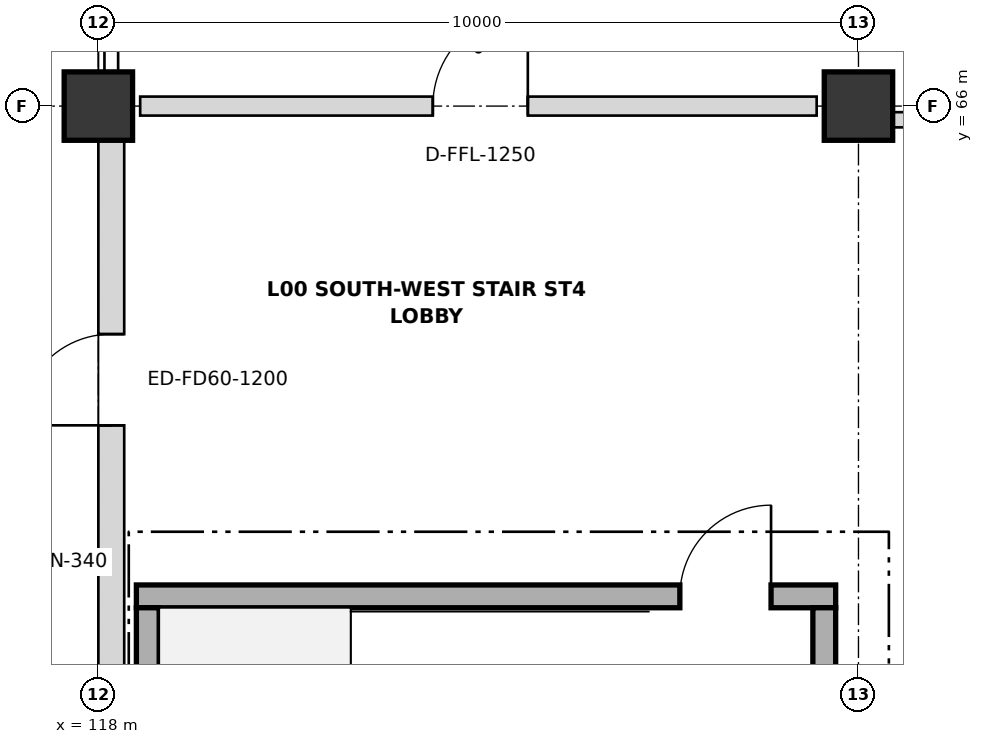
"""IFC4 building model, lengths in metres.
Left out: names, types, materials, properties, quantities, classifications, styles, units other than length and angle.
Written with IfcOpenShell. Run it as: python <this file> out.ifc"""

import sys

from ifc_helpers import new_model, si_unit, direction, frame, frame_2d, origin, origin_2d, place, context, subcontext, project, spatial, rectangle, extrude, element, fill, save


model = new_model("IFC4")
c1 = context("Model", 3, precision=1e-05, world=origin(), true_north=direction((0.0, 1.0)))
c2 = subcontext(c1, "Body", "Model", "MODEL_VIEW")
j1 = project(units=[si_unit("LENGTHUNIT", "METRE"), si_unit("PLANEANGLEUNIT", "RADIAN")], contexts=[c1])
p1 = place(None, origin())
s1 = spatial("IfcSite", under=j1, at=p1, CompositionType="ELEMENT")
p2 = place(p1, origin())
s2 = spatial("IfcBuilding", under=s1, at=p2, CompositionType="ELEMENT")
p3 = place(p2, origin())
s3 = spatial("IfcBuildingStorey", under=s2, at=p3, CompositionType="ELEMENT", Elevation=0.0)
for number, where, z_axis, x_axis in (
    (1, (118.0, 66.0, 0.0), (0.0, 0.0, 1.0), (1.0, 0.0, 0.0)),
    (2, (128.0, 66.0, 0.0), (0.0, 0.0, 1.0), (1.0, 0.0, 0.0)),
):
    element("IfcColumn", number, at=place(p3, frame(where, z_axis=z_axis, x_axis=x_axis)), inside=s3, PredefinedType="COLUMN", context=c2, shape_type="SweptSolid", body=[
        extrude(rectangle(XDim=0.9, YDim=0.9, at=origin_2d()), origin(), (0.0, 0.0, 1.0), 5.4),
    ])
p4 = place(p3, frame((118.17, 54.445, 0.0), z_axis=(0.0, 0.0, 1.0), x_axis=(0.0, 1.0, 0.0)))
e3 = element("IfcWall", 3, at=p4, inside=s3, PredefinedType="SOLIDWALL", context=c2, shape_type="SweptSolid", body=[
    extrude(rectangle(XDim=11.11, YDim=0.34, at=frame_2d((5.555, 0.0))), origin(), (0.0, 0.0, 1.0), 4.458),
])
p5 = place(p4, frame((7.355, 0.0, 0.0)))
e4 = element("IfcOpeningElement", 4, at=p5, cuts=e3, PredefinedType="OPENING", context=c2, shape_type="SweptSolid", body=[
    extrude(rectangle(XDim=1.2, YDim=2.2, at=frame_2d((0.6, 1.1))), frame((0.0, 0.18, 0.0), z_axis=(0.0, -1.0, 0.0), x_axis=(1.0, 0.0, 0.0)), (0.0, 0.0, 1.0), 0.36),
])
p6 = place(p3, frame((118.5, 59.55, 0.0), z_axis=(0.0, 0.0, 1.0), x_axis=(1.0, 0.0, 0.0)))
e5 = element("IfcWall", 5, at=p6, inside=s3, PredefinedType="SHEAR", context=c2, shape_type="SweptSolid", body=[
    extrude(rectangle(XDim=9.2, YDim=0.3, at=frame_2d((4.6, 0.0))), origin(), (0.0, 0.0, 1.0), 5.4),
])
p7 = place(p6, frame((7.15, 0.0, 0.0)))
e6 = element("IfcOpeningElement", 6, at=p7, cuts=e5, PredefinedType="OPENING", context=c2, shape_type="SweptSolid", body=[
    extrude(rectangle(XDim=1.2, YDim=2.15, at=frame_2d((0.6, 1.075))), frame((0.0, 0.16, 0.0), z_axis=(0.0, -1.0, 0.0), x_axis=(1.0, 0.0, 0.0)), (0.0, 0.0, 1.0), 0.32),
])
for number, where, z_axis, x_axis in (
    (7, (127.55, 59.4, 0.0), (0.0, 0.0, 1.0), (0.0, -1.0, 0.0)),
    (8, (118.65, 54.9, 0.0), (0.0, 0.0, 1.0), (0.0, 1.0, 0.0)),
):
    element("IfcWall", number, at=place(p3, frame(where, z_axis=z_axis, x_axis=x_axis)), inside=s3, PredefinedType="SHEAR", context=c2, shape_type="SweptSolid", body=[
        extrude(rectangle(XDim=4.5, YDim=0.3, at=frame_2d((2.25, 0.0))), origin(), (0.0, 0.0, 1.0), 5.4),
    ])
p8 = place(p3, frame((118.55, 66.0, 0.0), z_axis=(0.0, 0.0, 1.0), x_axis=(1.0, 0.0, 0.0)))
e9 = element("IfcWall", 9, at=p8, inside=s3, PredefinedType="PARTITIONING", context=c2, shape_type="SweptSolid", body=[
    extrude(rectangle(XDim=8.9, YDim=0.25, at=frame_2d((4.45, 0.0))), origin(), (0.0, 0.0, 1.0), 4.258),
])
p9 = place(p8, frame((3.85, 0.0, 0.0)))
e10 = element("IfcOpeningElement", 10, at=p9, cuts=e9, PredefinedType="OPENING", context=c2, shape_type="SweptSolid", body=[
    extrude(rectangle(XDim=1.25, YDim=2.15, at=frame_2d((0.625, 1.075))), frame((0.0, 0.135, 0.0), z_axis=(0.0, -1.0, 0.0), x_axis=(1.0, 0.0, 0.0)), (0.0, 0.0, 1.0), 0.27),
])
p10 = place(p3, frame((128.3, 65.82, 0.0), z_axis=(0.0, 0.0, 1.0), x_axis=(1.0, 0.0, 0.0)))
e11 = element("IfcWall", 11, at=p10, inside=s3, PredefinedType="PARTITIONING", context=c2, shape_type="SweptSolid", body=[
    extrude(rectangle(XDim=29.4, YDim=0.2, at=frame_2d((14.7, 0.0))), origin(), (0.0, 0.0, 1.0), 4.258),
])
p11 = place(p10, frame((13.8, 0.0, 0.0)))
e12 = element("IfcOpeningElement", 12, at=p11, cuts=e11, PredefinedType="OPENING", context=c2, shape_type="SweptSolid", body=[
    extrude(rectangle(XDim=1.8, YDim=2.2, at=frame_2d((0.9, 1.1))), frame((0.0, 0.11, 0.0), z_axis=(0.0, -1.0, 0.0), x_axis=(1.0, 0.0, 0.0)), (0.0, 0.0, 1.0), 0.22),
])
p12 = place(p5, origin())
e13 = element("IfcDoor", 13, at=p12, inside=s3, OperationType="SINGLE_SWING_LEFT", PredefinedType="DOOR", context=c2, shape_type="SweptSolid", body=[
    extrude(rectangle(XDim=1.2, YDim=2.2, at=frame_2d((0.6, 1.1))), frame((0.0, 0.025, 0.0), z_axis=(0.0, -1.0, 0.0), x_axis=(1.0, 0.0, 0.0)), (0.0, 0.0, 1.0), 0.05),
])
fill(e4, e13)
p13 = place(p7, origin())
e14 = element("IfcDoor", 14, at=p13, inside=s3, OperationType="SINGLE_SWING_RIGHT", PredefinedType="DOOR", context=c2, shape_type="SweptSolid", body=[
    extrude(rectangle(XDim=1.2, YDim=2.15, at=frame_2d((0.6, 1.075))), frame((0.0, 0.025, 0.0), z_axis=(0.0, -1.0, 0.0), x_axis=(1.0, 0.0, 0.0)), (0.0, 0.0, 1.0), 0.05),
])
fill(e6, e14)
p14 = place(p9, origin())
e15 = element("IfcDoor", 15, at=p14, inside=s3, OperationType="SINGLE_SWING_RIGHT", PredefinedType="DOOR", context=c2, shape_type="SweptSolid", body=[
    extrude(rectangle(XDim=1.25, YDim=2.15, at=frame_2d((0.625, 1.075))), frame((0.0, 0.025, 0.0), z_axis=(0.0, -1.0, 0.0), x_axis=(1.0, 0.0, 0.0)), (0.0, 0.0, 1.0), 0.05),
])
fill(e10, e15)
save(model, sys.argv[1])
